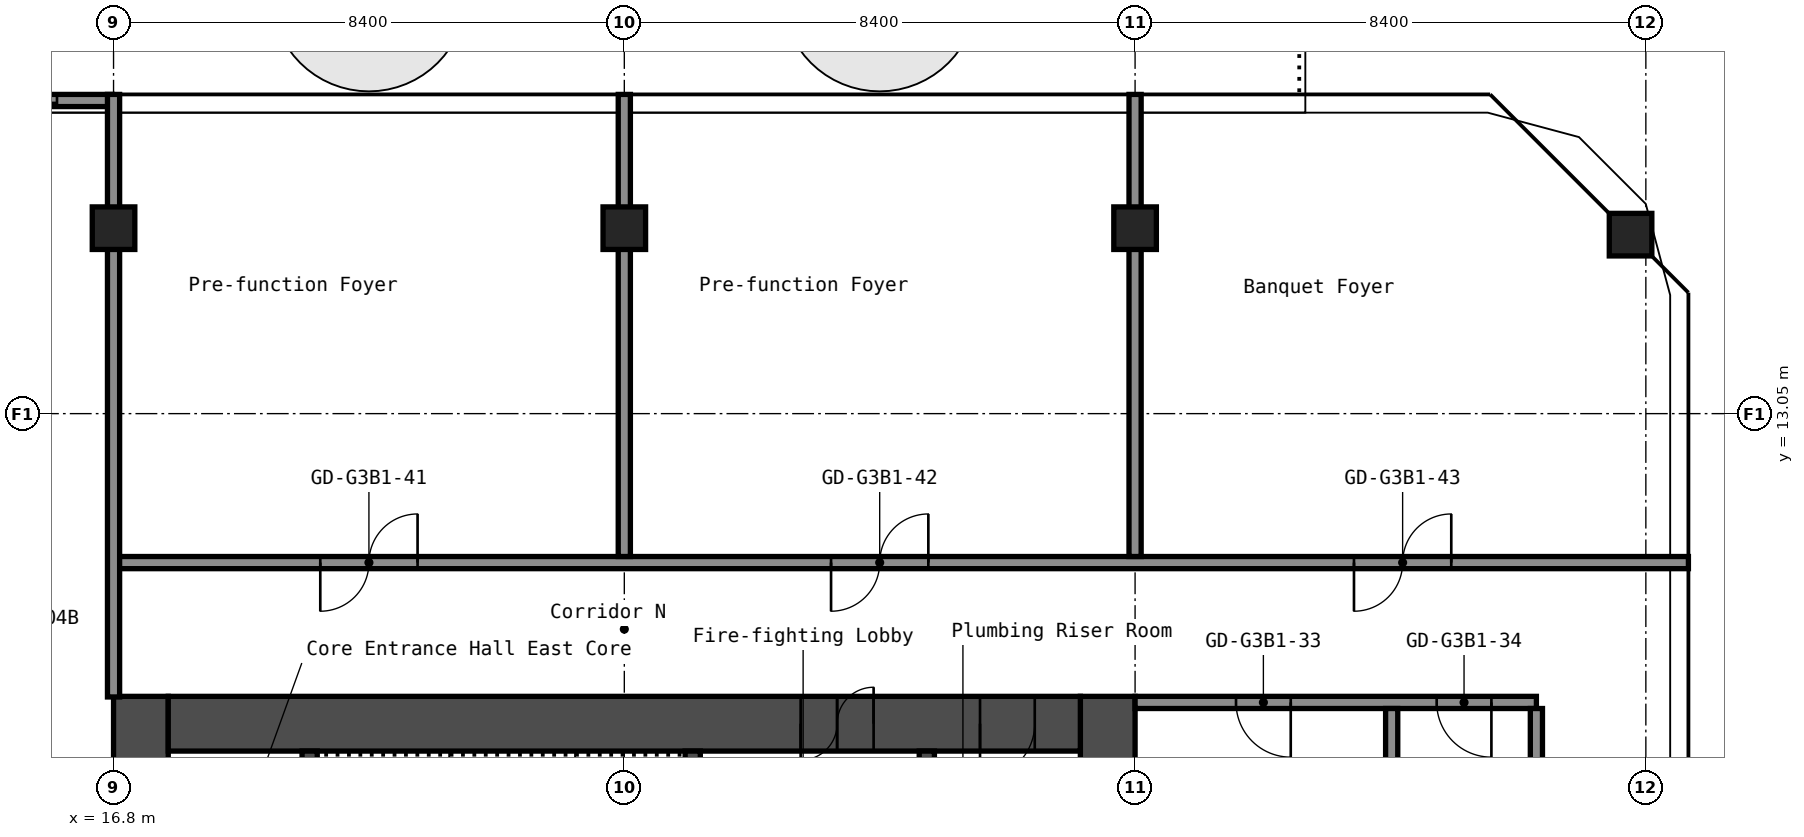
"""IFC4 building model, lengths in metres.
Left out: names, types, materials, properties, quantities, classifications, styles, units other than length and angle.
Written with IfcOpenShell. Run it as: python <this file> out.ifc"""

import sys

from ifc_helpers import new_model, si_unit, direction, frame, frame_2d, origin, origin_2d, place, context, subcontext, project, spatial, rectangle, hollow_rectangle, extrude, element, fill, save


model = new_model("IFC4")
c1 = context("Model", 3, precision=1e-05, world=origin(), true_north=direction((0.0, 1.0)))
c2 = subcontext(c1, "Body", "Model", "MODEL_VIEW")
j1 = project(units=[si_unit("LENGTHUNIT", "METRE"), si_unit("PLANEANGLEUNIT", "RADIAN")], contexts=[c1])
p1 = place(None, origin())
s1 = spatial("IfcSite", under=j1, at=p1, CompositionType="ELEMENT")
p2 = place(p1, origin())
s2 = spatial("IfcBuilding", under=s1, at=p2, CompositionType="ELEMENT")
p3 = place(p2, frame((0.0, 0.0, 150.2)))
s3 = spatial("IfcBuildingStorey", under=s2, at=p3, CompositionType="ELEMENT", Elevation=150.2)
for number, where, z_axis, x_axis in (
    (1, (16.8, 16.1, 0.0), (0.0, 0.0, 1.0), (1.0, 0.0, 0.0)),
    (2, (25.2, 16.1, 0.0), (0.0, 0.0, 1.0), (1.0, 0.0, 0.0)),
    (3, (33.6, 16.1, 0.0), (0.0, 0.0, 1.0), (1.0, 0.0, 0.0)),
    (4, (41.749, 15.994, 0.0), (0.0, 0.0, 1.0), (1.0, 0.0, 0.0)),
):
    element("IfcColumn", number, at=place(p3, frame(where, z_axis=z_axis, x_axis=x_axis)), inside=s3, PredefinedType="COLUMN", context=c2, shape_type="SweptSolid", body=[
        extrude(hollow_rectangle(XDim=0.7, YDim=0.7, WallThickness=0.028, at=origin_2d()), origin(), (0.0, 0.0, 1.0), 2.75),
    ])
p4 = place(p3, frame((17.25, -8.4, 0.0), z_axis=(0.0, 0.0, 1.0), x_axis=(0.0, 1.0, 0.0)))
e5 = element("IfcWall", 5, at=p4, inside=s3, PredefinedType="SHEAR", context=c2, shape_type="SweptSolid", body=[
    extrude(rectangle(XDim=16.8, YDim=0.9, at=frame_2d((8.4, 0.0))), origin(), (0.0, 0.0, 1.0), 2.75),
])
p5 = place(p4, frame((7.1, 0.0, 0.0)))
e6 = element("IfcOpeningElement", 6, at=p5, cuts=e5, PredefinedType="OPENING", context=c2, shape_type="SweptSolid", body=[
    extrude(rectangle(XDim=1.6, YDim=2.1, at=frame_2d((0.8, 1.05))), frame((0.0, 0.46, 0.0), z_axis=(0.0, -1.0, 0.0), x_axis=(1.0, 0.0, 0.0)), (0.0, 0.0, 1.0), 0.92),
])
p6 = place(p3, frame((33.15, -8.4, 0.0), z_axis=(0.0, 0.0, 1.0), x_axis=(0.0, 1.0, 0.0)))
e7 = element("IfcWall", 7, at=p6, inside=s3, PredefinedType="SHEAR", context=c2, shape_type="SweptSolid", body=[
    extrude(rectangle(XDim=16.8, YDim=0.9, at=frame_2d((8.4, 0.0))), origin(), (0.0, 0.0, 1.0), 2.75),
])
p7 = place(p3, frame((17.7, 7.95, 0.0), z_axis=(0.0, 0.0, 1.0), x_axis=(1.0, 0.0, 0.0)))
e8 = element("IfcWall", 8, at=p7, inside=s3, PredefinedType="SHEAR", context=c2, shape_type="SweptSolid", body=[
    extrude(rectangle(XDim=15.0, YDim=0.9, at=frame_2d((7.5, 0.0))), origin(), (0.0, 0.0, 1.0), 2.75),
])
p8 = place(p7, frame((10.4, 0.0, 0.0)))
e9 = element("IfcOpeningElement", 9, at=p8, cuts=e8, PredefinedType="OPENING", context=c2, shape_type="SweptSolid", body=[
    extrude(rectangle(XDim=1.2, YDim=2.1, at=frame_2d((0.6, 1.05))), frame((0.0, 0.46, 0.0), z_axis=(0.0, -1.0, 0.0), x_axis=(1.0, 0.0, 0.0)), (0.0, 0.0, 1.0), 0.92),
])
p9 = place(p7, frame((13.35, 0.0, 0.0)))
e10 = element("IfcOpeningElement", 10, at=p9, cuts=e8, PredefinedType="OPENING", context=c2, shape_type="SweptSolid", body=[
    extrude(rectangle(XDim=0.9, YDim=2.1, at=frame_2d((0.45, 1.05))), frame((0.0, 0.46, 0.0), z_axis=(0.0, -1.0, 0.0), x_axis=(1.0, 0.0, 0.0)), (0.0, 0.0, 1.0), 0.92),
])
p10 = place(p3, frame((20.025, 1.2, 0.0), z_axis=(0.0, 0.0, 1.0), x_axis=(0.0, 1.0, 0.0)))
e11 = element("IfcWall", 11, at=p10, inside=s3, PredefinedType="SHEAR", context=c2, shape_type="SweptSolid", body=[
    extrude(rectangle(XDim=6.3, YDim=0.25, at=frame_2d((3.15, 0.0))), origin(), (0.0, 0.0, 1.0), 2.75),
])
p11 = place(p3, frame((26.325, 3.75, 0.0), z_axis=(0.0, 0.0, 1.0), x_axis=(0.0, 1.0, 0.0)))
e12 = element("IfcWall", 12, at=p11, inside=s3, PredefinedType="SHEAR", context=c2, shape_type="SweptSolid", body=[
    extrude(rectangle(XDim=3.75, YDim=0.25, at=frame_2d((1.875, 0.0))), origin(), (0.0, 0.0, 1.0), 2.75),
])
p12 = place(p11, frame((1.25, 0.0, 0.0)))
e13 = element("IfcOpeningElement", 13, at=p12, cuts=e12, PredefinedType="OPENING", context=c2, shape_type="SweptSolid", body=[
    extrude(rectangle(XDim=1.2, YDim=2.1, at=frame_2d((0.6, 1.05))), frame((0.0, 0.135, 0.0), z_axis=(0.0, -1.0, 0.0), x_axis=(1.0, 0.0, 0.0)), (0.0, 0.0, 1.0), 0.27),
])
p13 = place(p3, frame((30.175, 1.45, 0.0), z_axis=(0.0, 0.0, 1.0), x_axis=(0.0, 1.0, 0.0)))
e14 = element("IfcWall", 14, at=p13, inside=s3, PredefinedType="SHEAR", context=c2, shape_type="SweptSolid", body=[
    extrude(rectangle(XDim=6.05, YDim=0.25, at=frame_2d((3.025, 0.0))), origin(), (0.0, 0.0, 1.0), 2.75),
])
p14 = place(p13, frame((2.625, 0.0, 0.0)))
e15 = element("IfcOpeningElement", 15, at=p14, cuts=e14, PredefinedType="OPENING", context=c2, shape_type="SweptSolid", body=[
    extrude(rectangle(XDim=1.1, YDim=2.1, at=frame_2d((0.55, 1.05))), frame((0.0, 0.135, 0.0), z_axis=(0.0, -1.0, 0.0), x_axis=(1.0, 0.0, 0.0)), (0.0, 0.0, 1.0), 0.27),
])
p15 = place(p3, frame((33.6, 8.3, 0.0), z_axis=(0.0, 0.0, 1.0), x_axis=(1.0, 0.0, 0.0)))
e16 = element("IfcWall", 16, at=p15, inside=s3, PredefinedType="PARTITIONING", context=c2, shape_type="SweptSolid", body=[
    extrude(rectangle(XDim=6.6, YDim=0.2, at=frame_2d((3.3, 0.0))), origin(), (0.0, 0.0, 1.0), 2.75),
])
p16 = place(p15, frame((1.66, 0.0, 0.0)))
e17 = element("IfcOpeningElement", 17, at=p16, cuts=e16, PredefinedType="OPENING", context=c2, shape_type="SweptSolid", body=[
    extrude(rectangle(XDim=0.9, YDim=2.1, at=frame_2d((0.45, 1.05))), frame((0.0, 0.11, 0.0), z_axis=(0.0, -1.0, 0.0), x_axis=(1.0, 0.0, 0.0)), (0.0, 0.0, 1.0), 0.22),
])
p17 = place(p15, frame((4.96, 0.0, 0.0)))
e18 = element("IfcOpeningElement", 18, at=p17, cuts=e16, PredefinedType="OPENING", context=c2, shape_type="SweptSolid", body=[
    extrude(rectangle(XDim=0.9, YDim=2.1, at=frame_2d((0.45, 1.05))), frame((0.0, 0.11, 0.0), z_axis=(0.0, -1.0, 0.0), x_axis=(1.0, 0.0, 0.0)), (0.0, 0.0, 1.0), 0.22),
])
p18 = place(p3, frame((16.8, 10.6, 0.0), z_axis=(0.0, 0.0, 1.0), x_axis=(1.0, 0.0, 0.0)))
e19 = element("IfcWall", 19, at=p18, inside=s3, PredefinedType="PARTITIONING", context=c2, shape_type="SweptSolid", body=[
    extrude(rectangle(XDim=25.9, YDim=0.2, at=frame_2d((12.95, 0.0))), origin(), (0.0, 0.0, 1.0), 2.75),
])
p19 = place(p18, frame((3.4, 0.0, 0.0)))
e20 = element("IfcOpeningElement", 20, at=p19, cuts=e19, PredefinedType="OPENING", context=c2, shape_type="SweptSolid", body=[
    extrude(rectangle(XDim=1.6, YDim=2.1, at=frame_2d((0.8, 1.05))), frame((0.0, 0.11, 0.0), z_axis=(0.0, -1.0, 0.0), x_axis=(1.0, 0.0, 0.0)), (0.0, 0.0, 1.0), 0.22),
])
p20 = place(p18, frame((11.8, 0.0, 0.0)))
e21 = element("IfcOpeningElement", 21, at=p20, cuts=e19, PredefinedType="OPENING", context=c2, shape_type="SweptSolid", body=[
    extrude(rectangle(XDim=1.6, YDim=2.1, at=frame_2d((0.8, 1.05))), frame((0.0, 0.11, 0.0), z_axis=(0.0, -1.0, 0.0), x_axis=(1.0, 0.0, 0.0)), (0.0, 0.0, 1.0), 0.22),
])
p21 = place(p18, frame((20.4, 0.0, 0.0)))
e22 = element("IfcOpeningElement", 22, at=p21, cuts=e19, PredefinedType="OPENING", context=c2, shape_type="SweptSolid", body=[
    extrude(rectangle(XDim=1.6, YDim=2.1, at=frame_2d((0.8, 1.05))), frame((0.0, 0.11, 0.0), z_axis=(0.0, -1.0, 0.0), x_axis=(1.0, 0.0, 0.0)), (0.0, 0.0, 1.0), 0.22),
])
p22 = place(p3, frame((16.8, 8.39, 0.0), z_axis=(0.0, 0.0, 1.0), x_axis=(0.0, 1.0, 0.0)))
e23 = element("IfcWall", 23, at=p22, inside=s3, PredefinedType="PARTITIONING", context=c2, shape_type="SweptSolid", body=[
    extrude(rectangle(XDim=9.91, YDim=0.2, at=frame_2d((4.955, 0.0))), origin(), (0.0, 0.0, 1.0), 2.75),
])
for number, where, z_axis, x_axis in (
    (24, (25.2, 10.7, 0.0), (0.0, 0.0, 1.0), (0.0, 1.0, 0.0)),
    (25, (33.6, 10.7, 0.0), (0.0, 0.0, 1.0), (0.0, 1.0, 0.0)),
):
    element("IfcWall", number, at=place(p3, frame(where, z_axis=z_axis, x_axis=x_axis)), inside=s3, PredefinedType="PARTITIONING", context=c2, shape_type="SweptSolid", body=[
        extrude(rectangle(XDim=7.6, YDim=0.2, at=frame_2d((3.8, 0.0))), origin(), (0.0, 0.0, 1.0), 2.75),
    ])
p23 = place(p3, frame((37.82, 0.0, 0.0), z_axis=(0.0, 0.0, 1.0), x_axis=(0.0, 1.0, 0.0)))
e26 = element("IfcWall", 26, at=p23, inside=s3, PredefinedType="PARTITIONING", context=c2, shape_type="SweptSolid", body=[
    extrude(rectangle(XDim=8.2, YDim=0.2, at=frame_2d((4.1, 0.0))), origin(), (0.0, 0.0, 1.0), 2.75),
])
p24 = place(p3, frame((40.2, -8.2, 0.0), z_axis=(0.0, 0.0, 1.0), x_axis=(0.0, 1.0, 0.0)))
e27 = element("IfcWall", 27, at=p24, inside=s3, PredefinedType="PARTITIONING", context=c2, shape_type="SweptSolid", body=[
    extrude(rectangle(XDim=16.4, YDim=0.2, at=frame_2d((8.2, 0.0))), origin(), (0.0, 0.0, 1.0), 2.75),
])
p25 = place(p3, frame((16.78, 18.2, 0.0), z_axis=(0.0, 0.0, 1.0), x_axis=(-1.0, 0.0, 0.0)))
p26 = place(p25, frame((0.91, 0.0, 0.0)))
p27 = place(p26, frame((2.4, 0.0, 0.0), z_axis=(0.0, 0.0, 1.0), x_axis=(-1.0, 0.0, 0.0)))
e28 = element("IfcDoor", 28, at=p27, inside=s3, OperationType="SLIDING_TO_LEFT", PredefinedType="DOOR", context=c2, shape_type="SweptSolid", body=[
    extrude(rectangle(XDim=2.4, YDim=2.2, at=frame_2d((1.2, 1.1))), frame((0.0, 0.025, 0.0), z_axis=(0.0, -1.0, 0.0), x_axis=(1.0, 0.0, 0.0)), (0.0, 0.0, 1.0), 0.05),
])
p28 = place(p8, origin())
e29 = element("IfcDoor", 29, at=p28, inside=s3, OperationType="DOUBLE_DOOR_SINGLE_SWING", PredefinedType="DOOR", context=c2, shape_type="SweptSolid", body=[
    extrude(rectangle(XDim=1.2, YDim=2.1, at=frame_2d((0.6, 1.05))), frame((0.0, 0.025, 0.0), z_axis=(0.0, -1.0, 0.0), x_axis=(1.0, 0.0, 0.0)), (0.0, 0.0, 1.0), 0.05),
])
fill(e9, e29)
p29 = place(p9, origin())
e30 = element("IfcDoor", 30, at=p29, inside=s3, OperationType="SINGLE_SWING_LEFT", PredefinedType="DOOR", context=c2, shape_type="SweptSolid", body=[
    extrude(rectangle(XDim=0.9, YDim=2.1, at=frame_2d((0.45, 1.05))), frame((0.0, 0.025, 0.0), z_axis=(0.0, -1.0, 0.0), x_axis=(1.0, 0.0, 0.0)), (0.0, 0.0, 1.0), 0.05),
])
fill(e10, e30)
p30 = place(p16, origin())
e31 = element("IfcDoor", 31, at=p30, inside=s3, OperationType="SINGLE_SWING_RIGHT", PredefinedType="DOOR", context=c2, shape_type="SweptSolid", body=[
    extrude(rectangle(XDim=0.9, YDim=2.1, at=frame_2d((0.45, 1.05))), frame((0.0, 0.025, 0.0), z_axis=(0.0, -1.0, 0.0), x_axis=(1.0, 0.0, 0.0)), (0.0, 0.0, 1.0), 0.05),
])
fill(e17, e31)
p31 = place(p17, origin())
e32 = element("IfcDoor", 32, at=p31, inside=s3, OperationType="SINGLE_SWING_RIGHT", PredefinedType="DOOR", context=c2, shape_type="SweptSolid", body=[
    extrude(rectangle(XDim=0.9, YDim=2.1, at=frame_2d((0.45, 1.05))), frame((0.0, 0.025, 0.0), z_axis=(0.0, -1.0, 0.0), x_axis=(1.0, 0.0, 0.0)), (0.0, 0.0, 1.0), 0.05),
])
fill(e18, e32)
p32 = place(p19, origin())
e33 = element("IfcDoor", 33, at=p32, inside=s3, OperationType="DOUBLE_DOOR_SINGLE_SWING", PredefinedType="DOOR", context=c2, shape_type="SweptSolid", body=[
    extrude(rectangle(XDim=1.6, YDim=2.1, at=frame_2d((0.8, 1.05))), frame((0.0, 0.025, 0.0), z_axis=(0.0, -1.0, 0.0), x_axis=(1.0, 0.0, 0.0)), (0.0, 0.0, 1.0), 0.05),
])
fill(e20, e33)
p33 = place(p20, origin())
e34 = element("IfcDoor", 34, at=p33, inside=s3, OperationType="DOUBLE_DOOR_SINGLE_SWING", PredefinedType="DOOR", context=c2, shape_type="SweptSolid", body=[
    extrude(rectangle(XDim=1.6, YDim=2.1, at=frame_2d((0.8, 1.05))), frame((0.0, 0.025, 0.0), z_axis=(0.0, -1.0, 0.0), x_axis=(1.0, 0.0, 0.0)), (0.0, 0.0, 1.0), 0.05),
])
fill(e21, e34)
p34 = place(p21, origin())
e35 = element("IfcDoor", 35, at=p34, inside=s3, OperationType="DOUBLE_DOOR_SINGLE_SWING", PredefinedType="DOOR", context=c2, shape_type="SweptSolid", body=[
    extrude(rectangle(XDim=1.6, YDim=2.1, at=frame_2d((0.8, 1.05))), frame((0.0, 0.025, 0.0), z_axis=(0.0, -1.0, 0.0), x_axis=(1.0, 0.0, 0.0)), (0.0, 0.0, 1.0), 0.05),
])
fill(e22, e35)
save(model, sys.argv[1])
